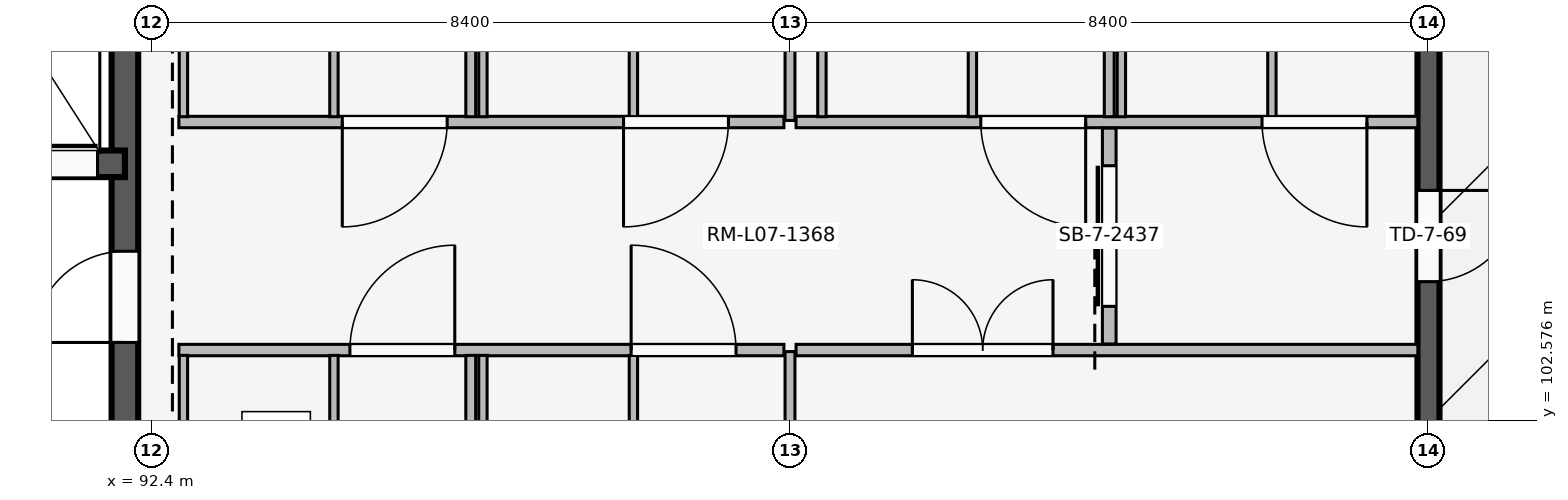
"""IFC4 building model, lengths in metres.
Left out: names, types, materials, properties, quantities, classifications, styles, units other than length and angle.
Written with IfcOpenShell. Run it as: python <this file> out.ifc"""

import sys

from ifc_helpers import new_model, si_unit, direction, frame, frame_2d, origin, place, context, subcontext, project, spatial, rectangle, extrude, element, fill, save


model = new_model("IFC4")
c1 = context("Model", 3, precision=1e-05, world=origin(), true_north=direction((0.0, 1.0)))
c2 = subcontext(c1, "Body", "Model", "MODEL_VIEW")
j1 = project(units=[si_unit("LENGTHUNIT", "METRE"), si_unit("PLANEANGLEUNIT", "RADIAN")], contexts=[c1])
p1 = place(None, origin())
s1 = spatial("IfcSite", under=j1, at=p1, CompositionType="ELEMENT")
p2 = place(p1, origin())
s2 = spatial("IfcBuilding", under=s1, at=p2, CompositionType="ELEMENT")
p3 = place(p2, frame((0.0, 0.0, 28.8)))
s3 = spatial("IfcBuildingStorey", under=s2, at=p3, CompositionType="ELEMENT", Elevation=28.8)
p4 = place(p3, frame((109.2, 108.93, 0.0), z_axis=(0.0, 0.0, 1.0), x_axis=(0.0, -1.0, 0.0)))
e1 = element("IfcWall", 1, at=p4, inside=s3, PredefinedType="SOLIDWALL", context=c2, shape_type="SweptSolid", body=[
    extrude(rectangle(XDim=7.86, YDim=0.29, at=frame_2d((3.93, 0.0))), origin(), (0.0, 0.0, 1.0), 3.34),
])
p5 = place(p4, frame((3.33, 0.0, 0.0)))
e2 = element("IfcOpeningElement", 2, at=p5, cuts=e1, PredefinedType="OPENING", context=c2, shape_type="SweptSolid", body=[
    extrude(rectangle(XDim=1.2, YDim=2.25, at=frame_2d((0.6, 1.125))), frame((0.0, 0.155, 0.0), z_axis=(0.0, -1.0, 0.0), x_axis=(1.0, 0.0, 0.0)), (0.0, 0.0, 1.0), 0.31),
])
p6 = place(p3, frame((92.05, 101.2, 0.0), z_axis=(0.0, 0.0, 1.0), x_axis=(0.0, 1.0, 0.0)))
e3 = element("IfcWall", 3, at=p6, inside=s3, PredefinedType="SHEAR", context=c2, shape_type="SweptSolid", body=[
    extrude(rectangle(XDim=7.55, YDim=0.35, at=frame_2d((3.775, 0.0))), origin(), (0.0, 0.0, 1.0), 3.94),
])
p7 = place(p6, frame((2.4, 0.0, 0.0)))
e4 = element("IfcOpeningElement", 4, at=p7, cuts=e3, PredefinedType="OPENING", context=c2, shape_type="SweptSolid", body=[
    extrude(rectangle(XDim=1.2, YDim=2.2, at=frame_2d((0.6, 1.1))), frame((0.0, 0.185, 0.0), z_axis=(0.0, -1.0, 0.0), x_axis=(1.0, 0.0, 0.0)), (0.0, 0.0, 1.0), 0.37),
])
p8 = place(p3, frame((88.25, 105.95, 0.0), z_axis=(0.0, 0.0, 1.0), x_axis=(1.0, 0.0, 0.0)))
e5 = element("IfcWall", 5, at=p8, inside=s3, PredefinedType="SHEAR", context=c2, shape_type="SweptSolid", body=[
    extrude(rectangle(XDim=3.8, YDim=0.35, at=frame_2d((1.9, 0.0))), origin(), (0.0, 0.0, 1.0), 3.94),
])
p9 = place(p8, frame((0.32, 0.0, 0.0)))
e6 = element("IfcOpeningElement", 6, at=p9, cuts=e5, PredefinedType="OPENING", context=c2, shape_type="SweptSolid", body=[
    extrude(rectangle(XDim=1.35, YDim=2.25, at=frame_2d((0.675, 1.125))), frame((0.0, 0.185, 0.0), z_axis=(0.0, -1.0, 0.0), x_axis=(1.0, 0.0, 0.0)), (0.0, 0.0, 1.0), 0.37),
])
p10 = place(p8, frame((2.04, 0.0, 0.0)))
e7 = element("IfcOpeningElement", 7, at=p10, cuts=e5, PredefinedType="OPENING", context=c2, shape_type="SweptSolid", body=[
    extrude(rectangle(XDim=1.4, YDim=2.25, at=frame_2d((0.7, 1.125))), frame((0.0, 0.185, 0.0), z_axis=(0.0, -1.0, 0.0), x_axis=(1.0, 0.0, 0.0)), (0.0, 0.0, 1.0), 0.37),
])
p11 = place(p3, frame((92.76, 103.5, 0.0), z_axis=(0.0, 0.0, 1.0), x_axis=(1.0, 0.0, 0.0)))
e8 = element("IfcWall", 8, at=p11, inside=s3, PredefinedType="PARTITIONING", context=c2, shape_type="SweptSolid", body=[
    extrude(rectangle(XDim=7.96, YDim=0.15, at=frame_2d((3.98, 0.0))), origin(), (0.0, 0.0, 1.0), 3.32),
])
p12 = place(p11, frame((2.25, 0.0, 0.0)))
e9 = element("IfcOpeningElement", 9, at=p12, cuts=e8, PredefinedType="OPENING", context=c2, shape_type="SweptSolid", body=[
    extrude(rectangle(XDim=1.38, YDim=2.25, at=frame_2d((0.69, 1.125))), frame((0.0, 0.085, 0.0), z_axis=(0.0, -1.0, 0.0), x_axis=(1.0, 0.0, 0.0)), (0.0, 0.0, 1.0), 0.17),
])
p13 = place(p11, frame((5.95, 0.0, 0.0)))
e10 = element("IfcOpeningElement", 10, at=p13, cuts=e8, PredefinedType="OPENING", context=c2, shape_type="SweptSolid", body=[
    extrude(rectangle(XDim=1.38, YDim=2.25, at=frame_2d((0.69, 1.125))), frame((0.0, 0.085, 0.0), z_axis=(0.0, -1.0, 0.0), x_axis=(1.0, 0.0, 0.0)), (0.0, 0.0, 1.0), 0.17),
])
p14 = place(p3, frame((96.6, 92.5, 0.0), z_axis=(0.0, 0.0, 1.0), x_axis=(0.0, 1.0, 0.0)))
e11 = element("IfcWall", 11, at=p14, inside=s3, PredefinedType="PARTITIONING", context=c2, shape_type="SweptSolid", body=[
    extrude(rectangle(XDim=10.93, YDim=0.13, at=frame_2d((5.465, 0.0))), origin(), (0.0, 0.0, 1.0), 3.32),
])
for number, where, z_axis, x_axis in (
    (12, (92.82, 100.82, 0.0), (0.0, 0.0, 1.0), (0.0, 1.0, 0.0)),
    (13, (94.8, 100.82, 0.0), (0.0, 0.0, 1.0), (0.0, 1.0, 0.0)),
    (14, (96.76, 100.82, 0.0), (0.0, 0.0, 1.0), (0.0, 1.0, 0.0)),
    (15, (98.74, 100.82, 0.0), (0.0, 0.0, 1.0), (0.0, 1.0, 0.0)),
):
    element("IfcWall", number, at=place(p3, frame(where, z_axis=z_axis, x_axis=x_axis)), inside=s3, PredefinedType="PARTITIONING", context=c2, shape_type="SweptSolid", body=[
        extrude(rectangle(XDim=2.61, YDim=0.11, at=frame_2d((1.305, 0.0))), origin(), (0.0, 0.0, 1.0), 3.32),
    ])
p15 = place(p3, frame((100.72, 106.5, 0.0), z_axis=(0.0, 0.0, 1.0), x_axis=(-1.0, 0.0, 0.0)))
e16 = element("IfcWall", 16, at=p15, inside=s3, PredefinedType="PARTITIONING", context=c2, shape_type="SweptSolid", body=[
    extrude(rectangle(XDim=7.96, YDim=0.15, at=frame_2d((3.98, 0.0))), origin(), (0.0, 0.0, 1.0), 3.32),
])
p16 = place(p15, frame((0.73, 0.0, 0.0)))
e17 = element("IfcOpeningElement", 17, at=p16, cuts=e16, PredefinedType="OPENING", context=c2, shape_type="SweptSolid", body=[
    extrude(rectangle(XDim=1.38, YDim=2.25, at=frame_2d((0.69, 1.125))), frame((0.0, 0.085, 0.0), z_axis=(0.0, -1.0, 0.0), x_axis=(1.0, 0.0, 0.0)), (0.0, 0.0, 1.0), 0.17),
])
p17 = place(p15, frame((4.43, 0.0, 0.0)))
e18 = element("IfcOpeningElement", 18, at=p17, cuts=e16, PredefinedType="OPENING", context=c2, shape_type="SweptSolid", body=[
    extrude(rectangle(XDim=1.38, YDim=2.25, at=frame_2d((0.69, 1.125))), frame((0.0, 0.085, 0.0), z_axis=(0.0, -1.0, 0.0), x_axis=(1.0, 0.0, 0.0)), (0.0, 0.0, 1.0), 0.17),
])
p18 = place(p3, frame((96.6, 106.57, 0.0), z_axis=(0.0, 0.0, 1.0), x_axis=(0.0, 1.0, 0.0)))
e19 = element("IfcWall", 19, at=p18, inside=s3, PredefinedType="PARTITIONING", context=c2, shape_type="SweptSolid", body=[
    extrude(rectangle(XDim=10.93, YDim=0.13, at=frame_2d((5.465, 0.0))), origin(), (0.0, 0.0, 1.0), 3.32),
])
for number, where, z_axis, x_axis in (
    (20, (92.82, 106.57, 0.0), (0.0, 0.0, 1.0), (0.0, 1.0, 0.0)),
    (21, (94.8, 106.57, 0.0), (0.0, 0.0, 1.0), (0.0, 1.0, 0.0)),
    (22, (96.76, 106.57, 0.0), (0.0, 0.0, 1.0), (0.0, 1.0, 0.0)),
    (23, (98.74, 106.57, 0.0), (0.0, 0.0, 1.0), (0.0, 1.0, 0.0)),
):
    element("IfcWall", number, at=place(p3, frame(where, z_axis=z_axis, x_axis=x_axis)), inside=s3, PredefinedType="PARTITIONING", context=c2, shape_type="SweptSolid", body=[
        extrude(rectangle(XDim=2.61, YDim=0.11, at=frame_2d((1.305, 0.0))), origin(), (0.0, 0.0, 1.0), 3.32),
    ])
for number, where, z_axis, x_axis in (
    (24, (100.8, 92.54, 0.0), (0.0, 0.0, 1.0), (0.0, 1.0, 0.0)),
    (25, (100.8, 106.52, 0.0), (0.0, 0.0, 1.0), (0.0, 1.0, 0.0)),
):
    element("IfcWall", number, at=place(p3, frame(where, z_axis=z_axis, x_axis=x_axis)), inside=s3, PredefinedType="PARTITIONING", context=c2, shape_type="SweptSolid", body=[
        extrude(rectangle(XDim=10.94, YDim=0.13, at=frame_2d((5.47, 0.0))), origin(), (0.0, 0.0, 1.0), 3.32),
    ])
p19 = place(p3, frame((100.88, 103.5, 0.0), z_axis=(0.0, 0.0, 1.0), x_axis=(1.0, 0.0, 0.0)))
e26 = element("IfcWall", 26, at=p19, inside=s3, PredefinedType="PARTITIONING", context=c2, shape_type="SweptSolid", body=[
    extrude(rectangle(XDim=8.18, YDim=0.15, at=frame_2d((4.09, 0.0))), origin(), (0.0, 0.0, 1.0), 3.32),
])
p20 = place(p19, frame((1.53, 0.0, 0.0)))
e27 = element("IfcOpeningElement", 27, at=p20, cuts=e26, PredefinedType="OPENING", context=c2, shape_type="SweptSolid", body=[
    extrude(rectangle(XDim=1.85, YDim=2.3, at=frame_2d((0.925, 1.15))), frame((0.0, 0.085, 0.0), z_axis=(0.0, -1.0, 0.0), x_axis=(1.0, 0.0, 0.0)), (0.0, 0.0, 1.0), 0.17),
])
p21 = place(p3, frame((109.06, 106.5, 0.0), z_axis=(0.0, 0.0, 1.0), x_axis=(-1.0, 0.0, 0.0)))
e28 = element("IfcWall", 28, at=p21, inside=s3, PredefinedType="PARTITIONING", context=c2, shape_type="SweptSolid", body=[
    extrude(rectangle(XDim=8.18, YDim=0.15, at=frame_2d((4.09, 0.0))), origin(), (0.0, 0.0, 1.0), 3.32),
])
p22 = place(p21, frame((0.67, 0.0, 0.0)))
e29 = element("IfcOpeningElement", 29, at=p22, cuts=e28, PredefinedType="OPENING", context=c2, shape_type="SweptSolid", body=[
    extrude(rectangle(XDim=1.38, YDim=2.25, at=frame_2d((0.69, 1.125))), frame((0.0, 0.085, 0.0), z_axis=(0.0, -1.0, 0.0), x_axis=(1.0, 0.0, 0.0)), (0.0, 0.0, 1.0), 0.17),
])
p23 = place(p21, frame((4.37, 0.0, 0.0)))
e30 = element("IfcOpeningElement", 30, at=p23, cuts=e28, PredefinedType="OPENING", context=c2, shape_type="SweptSolid", body=[
    extrude(rectangle(XDim=1.38, YDim=2.25, at=frame_2d((0.69, 1.125))), frame((0.0, 0.085, 0.0), z_axis=(0.0, -1.0, 0.0), x_axis=(1.0, 0.0, 0.0)), (0.0, 0.0, 1.0), 0.17),
])
p24 = place(p3, frame((105.0, 106.57, 0.0), z_axis=(0.0, 0.0, 1.0), x_axis=(0.0, 1.0, 0.0)))
e31 = element("IfcWall", 31, at=p24, inside=s3, PredefinedType="PARTITIONING", context=c2, shape_type="SweptSolid", body=[
    extrude(rectangle(XDim=10.93, YDim=0.13, at=frame_2d((5.465, 0.0))), origin(), (0.0, 0.0, 1.0), 3.32),
])
for number, where, z_axis, x_axis in (
    (32, (101.22, 106.57, 0.0), (0.0, 0.0, 1.0), (0.0, 1.0, 0.0)),
    (33, (103.2, 106.57, 0.0), (0.0, 0.0, 1.0), (0.0, 1.0, 0.0)),
    (34, (105.16, 106.57, 0.0), (0.0, 0.0, 1.0), (0.0, 1.0, 0.0)),
    (35, (107.14, 106.57, 0.0), (0.0, 0.0, 1.0), (0.0, 1.0, 0.0)),
):
    element("IfcWall", number, at=place(p3, frame(where, z_axis=z_axis, x_axis=x_axis)), inside=s3, PredefinedType="PARTITIONING", context=c2, shape_type="SweptSolid", body=[
        extrude(rectangle(XDim=2.61, YDim=0.11, at=frame_2d((1.305, 0.0))), origin(), (0.0, 0.0, 1.0), 3.32),
    ])
p25 = place(p3, frame((105.0, 103.58, 0.0), z_axis=(0.0, 0.0, 1.0), x_axis=(0.0, 1.0, 0.0)))
e36 = element("IfcWall", 36, at=p25, inside=s3, PredefinedType="PARTITIONING", context=c2, shape_type="SweptSolid", body=[
    extrude(rectangle(XDim=2.84, YDim=0.18, at=frame_2d((1.42, 0.0))), origin(), (0.0, 0.0, 1.0), 3.32),
])
p26 = place(p25, frame((0.495, 0.0, 0.0)))
e37 = element("IfcOpeningElement", 37, at=p26, cuts=e36, PredefinedType="OPENING", context=c2, shape_type="SweptSolid", body=[
    extrude(rectangle(XDim=1.85, YDim=2.3, at=frame_2d((0.925, 1.15))), frame((0.0, 0.1, 0.0), z_axis=(0.0, -1.0, 0.0), x_axis=(1.0, 0.0, 0.0)), (0.0, 0.0, 1.0), 0.2),
])
p27 = place(p5, origin())
e38 = element("IfcDoor", 38, at=p27, inside=s3, OperationType="SINGLE_SWING_LEFT", PredefinedType="DOOR", context=c2, shape_type="SweptSolid", body=[
    extrude(rectangle(XDim=1.2, YDim=2.25, at=frame_2d((0.6, 1.125))), frame((0.0, 0.025, 0.0), z_axis=(0.0, -1.0, 0.0), x_axis=(1.0, 0.0, 0.0)), (0.0, 0.0, 1.0), 0.05),
])
fill(e2, e38)
p28 = place(p7, origin())
e39 = element("IfcDoor", 39, at=p28, inside=s3, OperationType="SINGLE_SWING_LEFT", PredefinedType="DOOR", context=c2, shape_type="SweptSolid", body=[
    extrude(rectangle(XDim=1.2, YDim=2.2, at=frame_2d((0.6, 1.1))), frame((0.0, 0.025, 0.0), z_axis=(0.0, -1.0, 0.0), x_axis=(1.0, 0.0, 0.0)), (0.0, 0.0, 1.0), 0.05),
])
fill(e4, e39)
p29 = place(p10, origin())
e40 = element("IfcDoor", 40, at=p29, inside=s3, OperationType="SLIDING_TO_LEFT", PredefinedType="DOOR", context=c2, shape_type="SweptSolid", body=[
    extrude(rectangle(XDim=1.4, YDim=2.25, at=frame_2d((0.7, 1.125))), frame((0.0, 0.025, 0.0), z_axis=(0.0, -1.0, 0.0), x_axis=(1.0, 0.0, 0.0)), (0.0, 0.0, 1.0), 0.05),
])
fill(e7, e40)
p30 = place(p12, origin())
e41 = element("IfcDoor", 41, at=p30, inside=s3, OperationType="SINGLE_SWING_RIGHT", PredefinedType="DOOR", context=c2, shape_type="SweptSolid", body=[
    extrude(rectangle(XDim=1.38, YDim=2.25, at=frame_2d((0.69, 1.125))), frame((0.0, 0.025, 0.0), z_axis=(0.0, -1.0, 0.0), x_axis=(1.0, 0.0, 0.0)), (0.0, 0.0, 1.0), 0.05),
])
fill(e9, e41)
p31 = place(p13, origin())
e42 = element("IfcDoor", 42, at=p31, inside=s3, OperationType="SINGLE_SWING_LEFT", PredefinedType="DOOR", context=c2, shape_type="SweptSolid", body=[
    extrude(rectangle(XDim=1.38, YDim=2.25, at=frame_2d((0.69, 1.125))), frame((0.0, 0.025, 0.0), z_axis=(0.0, -1.0, 0.0), x_axis=(1.0, 0.0, 0.0)), (0.0, 0.0, 1.0), 0.05),
])
fill(e10, e42)
p32 = place(p16, origin())
e43 = element("IfcDoor", 43, at=p32, inside=s3, OperationType="SINGLE_SWING_RIGHT", PredefinedType="DOOR", context=c2, shape_type="SweptSolid", body=[
    extrude(rectangle(XDim=1.38, YDim=2.25, at=frame_2d((0.69, 1.125))), frame((0.0, 0.025, 0.0), z_axis=(0.0, -1.0, 0.0), x_axis=(1.0, 0.0, 0.0)), (0.0, 0.0, 1.0), 0.05),
])
fill(e17, e43)
p33 = place(p17, origin())
e44 = element("IfcDoor", 44, at=p33, inside=s3, OperationType="SINGLE_SWING_RIGHT", PredefinedType="DOOR", context=c2, shape_type="SweptSolid", body=[
    extrude(rectangle(XDim=1.38, YDim=2.25, at=frame_2d((0.69, 1.125))), frame((0.0, 0.025, 0.0), z_axis=(0.0, -1.0, 0.0), x_axis=(1.0, 0.0, 0.0)), (0.0, 0.0, 1.0), 0.05),
])
fill(e18, e44)
p34 = place(p20, origin())
e45 = element("IfcDoor", 45, at=p34, inside=s3, OperationType="DOUBLE_SWING_LEFT", PredefinedType="DOOR", context=c2, shape_type="SweptSolid", body=[
    extrude(rectangle(XDim=1.85, YDim=2.3, at=frame_2d((0.925, 1.15))), frame((0.0, 0.025, 0.0), z_axis=(0.0, -1.0, 0.0), x_axis=(1.0, 0.0, 0.0)), (0.0, 0.0, 1.0), 0.05),
])
fill(e27, e45)
p35 = place(p22, origin())
e46 = element("IfcDoor", 46, at=p35, inside=s3, OperationType="SINGLE_SWING_LEFT", PredefinedType="DOOR", context=c2, shape_type="SweptSolid", body=[
    extrude(rectangle(XDim=1.38, YDim=2.25, at=frame_2d((0.69, 1.125))), frame((0.0, 0.025, 0.0), z_axis=(0.0, -1.0, 0.0), x_axis=(1.0, 0.0, 0.0)), (0.0, 0.0, 1.0), 0.05),
])
fill(e29, e46)
p36 = place(p23, origin())
e47 = element("IfcDoor", 47, at=p36, inside=s3, OperationType="SINGLE_SWING_LEFT", PredefinedType="DOOR", context=c2, shape_type="SweptSolid", body=[
    extrude(rectangle(XDim=1.38, YDim=2.25, at=frame_2d((0.69, 1.125))), frame((0.0, 0.025, 0.0), z_axis=(0.0, -1.0, 0.0), x_axis=(1.0, 0.0, 0.0)), (0.0, 0.0, 1.0), 0.05),
])
fill(e30, e47)
p37 = place(p26, origin())
e48 = element("IfcDoor", 48, at=p37, inside=s3, OperationType="SLIDING_TO_LEFT", PredefinedType="DOOR", context=c2, shape_type="SweptSolid", body=[
    extrude(rectangle(XDim=1.85, YDim=2.3, at=frame_2d((0.925, 1.15))), frame((0.0, 0.025, 0.0), z_axis=(0.0, -1.0, 0.0), x_axis=(1.0, 0.0, 0.0)), (0.0, 0.0, 1.0), 0.05),
])
fill(e37, e48)
save(model, sys.argv[1])
